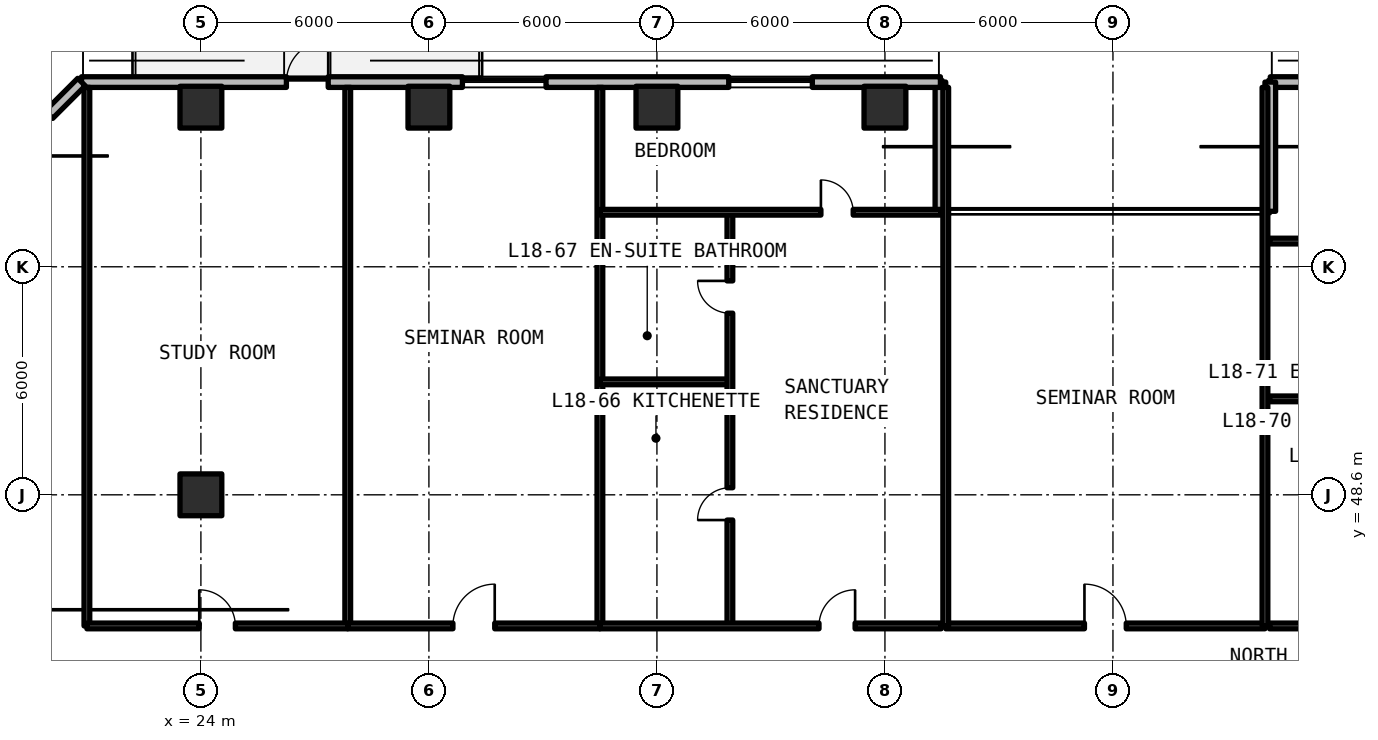
"""IFC4 building model, lengths in metres.
Left out: names, types, materials, properties, quantities, classifications, styles, units other than length and angle.
Written with IfcOpenShell. Run it as: python <this file> out.ifc"""

import sys

from ifc_helpers import new_model, si_unit, direction, frame, frame_2d, origin, origin_2d, place, context, subcontext, project, spatial, rectangle, extrude, element, fill, save


model = new_model("IFC4")
c1 = context("Model", 3, precision=1e-05, world=origin(), true_north=direction((0.0, 1.0)))
c2 = subcontext(c1, "Body", "Model", "MODEL_VIEW")
j1 = project(units=[si_unit("LENGTHUNIT", "METRE"), si_unit("PLANEANGLEUNIT", "RADIAN")], contexts=[c1])
p1 = place(None, origin())
s1 = spatial("IfcSite", under=j1, at=p1, CompositionType="ELEMENT")
p2 = place(p1, origin())
s2 = spatial("IfcBuilding", under=s1, at=p2, CompositionType="ELEMENT")
p3 = place(p2, frame((0.0, 0.0, 66.0)))
s3 = spatial("IfcBuildingStorey", under=s2, at=p3, CompositionType="ELEMENT", Elevation=66.0)
for number, where, z_axis, x_axis in (
    (1, (24.0, 48.6, 0.0), (0.0, 0.0, 1.0), (1.0, 0.0, 0.0)),
    (2, (24.0, 58.8, 0.0), (0.0, 0.0, 1.0), (1.0, 0.0, 0.0)),
    (3, (30.0, 58.8, 0.0), (0.0, 0.0, 1.0), (1.0, 0.0, 0.0)),
    (4, (36.0, 58.8, 0.0), (0.0, 0.0, 1.0), (1.0, 0.0, 0.0)),
    (5, (42.0, 58.8, 0.0), (0.0, 0.0, 1.0), (1.0, 0.0, 0.0)),
):
    element("IfcColumn", number, at=place(p3, frame(where, z_axis=z_axis, x_axis=x_axis)), inside=s3, PredefinedType="COLUMN", context=c2, shape_type="SweptSolid", body=[
        extrude(rectangle(XDim=1.1, YDim=1.1, at=origin_2d()), origin(), (0.0, 0.0, 1.0), 3.63),
    ])
p4 = place(p3, frame((96.542, 59.46, 0.0), z_axis=(0.0, 0.0, 1.0), x_axis=(-1.0, 0.0, 0.0)))
e6 = element("IfcWall", 6, at=p4, inside=s3, PredefinedType="SOLIDWALL", context=c2, shape_type="SweptSolid", body=[
    extrude(rectangle(XDim=44.402, YDim=0.28, at=frame_2d((22.201, 0.0))), origin(), (0.0, 0.0, 1.0), 3.41),
])
p5 = place(p4, frame((33.642, 0.0, 0.0)))
e7 = element("IfcOpeningElement", 7, at=p5, cuts=e6, PredefinedType="OPENING", context=c2, shape_type="SweptSolid", body=[
    extrude(rectangle(XDim=1.1, YDim=2.15, at=frame_2d((0.55, 1.075))), frame((0.0, 0.15, 0.0), z_axis=(0.0, -1.0, 0.0), x_axis=(1.0, 0.0, 0.0)), (0.0, 0.0, 1.0), 0.3),
])
p6 = place(p4, frame((20.292, 0.0, 0.0)))
e8 = element("IfcOpeningElement", 8, at=p6, cuts=e6, PredefinedType="OPENING", context=c2, shape_type="SweptSolid", body=[
    extrude(rectangle(XDim=1.1, YDim=2.15, at=frame_2d((0.55, 1.075))), frame((0.0, 0.15, 0.0), z_axis=(0.0, -1.0, 0.0), x_axis=(1.0, 0.0, 0.0)), (0.0, 0.0, 1.0), 0.3),
])
p7 = place(p4, frame((9.692, 0.0, 0.0)))
e9 = element("IfcOpeningElement", 9, at=p7, cuts=e6, PredefinedType="OPENING", context=c2, shape_type="SweptSolid", body=[
    extrude(rectangle(XDim=1.1, YDim=2.15, at=frame_2d((0.55, 1.075))), frame((0.0, 0.15, 0.0), z_axis=(0.0, -1.0, 0.0), x_axis=(1.0, 0.0, 0.0)), (0.0, 0.0, 1.0), 0.3),
])
p8 = place(p4, frame((39.514, 0.0, 0.78)))
e10 = element("IfcOpeningElement", 10, at=p8, cuts=e6, PredefinedType="OPENING", context=c2, shape_type="SweptSolid", body=[
    extrude(rectangle(XDim=2.2, YDim=1.66, at=frame_2d((1.1, 0.83))), frame((0.0, 0.15, 0.0), z_axis=(0.0, -1.0, 0.0), x_axis=(1.0, 0.0, 0.0)), (0.0, 0.0, 1.0), 0.3),
])
p9 = place(p4, frame((25.379, 0.0, 0.78)))
e11 = element("IfcOpeningElement", 11, at=p9, cuts=e6, PredefinedType="OPENING", context=c2, shape_type="SweptSolid", body=[
    extrude(rectangle(XDim=2.2, YDim=1.66, at=frame_2d((1.1, 0.83))), frame((0.0, 0.15, 0.0), z_axis=(0.0, -1.0, 0.0), x_axis=(1.0, 0.0, 0.0)), (0.0, 0.0, 1.0), 0.3),
])
p10 = place(p4, frame((2.564, 0.0, 0.78)))
e12 = element("IfcOpeningElement", 12, at=p10, cuts=e6, PredefinedType="OPENING", context=c2, shape_type="SweptSolid", body=[
    extrude(rectangle(XDim=2.2, YDim=1.66, at=frame_2d((1.1, 0.83))), frame((0.0, 0.15, 0.0), z_axis=(0.0, -1.0, 0.0), x_axis=(1.0, 0.0, 0.0)), (0.0, 0.0, 1.0), 0.3),
])
for number, where, z_axis, x_axis in (
    (13, (52.14, 59.46, 0.0), (0.0, 0.0, 1.0), (0.0, -1.0, 0.0)),
    (14, (43.46, 56.06, 0.0), (0.0, 0.0, 1.0), (0.0, 1.0, 0.0)),
):
    element("IfcWall", number, at=place(p3, frame(where, z_axis=z_axis, x_axis=x_axis)), inside=s3, PredefinedType="SOLIDWALL", context=c2, shape_type="SweptSolid", body=[
        extrude(rectangle(XDim=3.4, YDim=0.28, at=frame_2d((1.7, 0.0))), origin(), (0.0, 0.0, 1.0), 3.41),
    ])
p11 = place(p3, frame((43.46, 59.46, 0.0), z_axis=(0.0, 0.0, 1.0), x_axis=(-1.0, 0.0, 0.0)))
e15 = element("IfcWall", 15, at=p11, inside=s3, PredefinedType="SOLIDWALL", context=c2, shape_type="SweptSolid", body=[
    extrude(rectangle(XDim=22.602, YDim=0.28, at=frame_2d((11.301, 0.0))), origin(), (0.0, 0.0, 1.0), 3.41),
])
p12 = place(p11, frame((16.11, 0.0, 0.0)))
e16 = element("IfcOpeningElement", 16, at=p12, cuts=e15, PredefinedType="OPENING", context=c2, shape_type="SweptSolid", body=[
    extrude(rectangle(XDim=1.1, YDim=2.15, at=frame_2d((0.55, 1.075))), frame((0.0, 0.15, 0.0), z_axis=(0.0, -1.0, 0.0), x_axis=(1.0, 0.0, 0.0)), (0.0, 0.0, 1.0), 0.3),
])
p13 = place(p11, frame((10.378, 0.0, 0.78)))
e17 = element("IfcOpeningElement", 17, at=p13, cuts=e15, PredefinedType="OPENING", context=c2, shape_type="SweptSolid", body=[
    extrude(rectangle(XDim=2.2, YDim=1.66, at=frame_2d((1.1, 0.83))), frame((0.0, 0.15, 0.0), z_axis=(0.0, -1.0, 0.0), x_axis=(1.0, 0.0, 0.0)), (0.0, 0.0, 1.0), 0.3),
])
p14 = place(p11, frame((3.37, 0.0, 0.78)))
e18 = element("IfcOpeningElement", 18, at=p14, cuts=e15, PredefinedType="OPENING", context=c2, shape_type="SweptSolid", body=[
    extrude(rectangle(XDim=2.2, YDim=1.66, at=frame_2d((1.1, 0.83))), frame((0.0, 0.15, 0.0), z_axis=(0.0, -1.0, 0.0), x_axis=(1.0, 0.0, 0.0)), (0.0, 0.0, 1.0), 0.3),
])
p15 = place(p3, frame((20.858, 59.46, 0.0), z_axis=(0.0, 0.0, 1.0), x_axis=(-0.707106781187, -0.707106781187, 0.0)))
e19 = element("IfcWall", 19, at=p15, inside=s3, PredefinedType="SOLIDWALL", context=c2, shape_type="SweptSolid", body=[
    extrude(rectangle(XDim=5.824, YDim=0.28, at=frame_2d((2.912, 0.0))), origin(), (0.0, 0.0, 1.0), 3.41),
])
p16 = place(p15, frame((1.212, 0.0, 0.78)))
e20 = element("IfcOpeningElement", 20, at=p16, cuts=e19, PredefinedType="OPENING", context=c2, shape_type="SweptSolid", body=[
    extrude(rectangle(XDim=3.4, YDim=1.66, at=frame_2d((1.7, 0.83))), frame((0.0, 0.15, 0.0), z_axis=(0.0, -1.0, 0.0), x_axis=(1.0, 0.0, 0.0)), (0.0, 0.0, 1.0), 0.3),
])
p17 = place(p3, frame((43.6, 45.15, 0.0), z_axis=(0.0, 0.0, 1.0), x_axis=(1.0, 0.0, 0.0)))
e21 = element("IfcWall", 21, at=p17, inside=s3, PredefinedType="SOLIDWALL", context=c2, shape_type="SweptSolid", body=[
    extrude(rectangle(XDim=8.4, YDim=0.15, at=frame_2d((4.2, 0.0))), origin(), (0.0, 0.0, 1.0), 2.63),
])
p18 = place(p17, frame((3.65, 0.0, 0.0)))
e22 = element("IfcOpeningElement", 22, at=p18, cuts=e21, PredefinedType="OPENING", context=c2, shape_type="SweptSolid", body=[
    extrude(rectangle(XDim=1.1, YDim=2.15, at=frame_2d((0.55, 1.075))), frame((0.0, 0.085, 0.0), z_axis=(0.0, -1.0, 0.0), x_axis=(1.0, 0.0, 0.0)), (0.0, 0.0, 1.0), 0.17),
])
for number, where, z_axis, x_axis in (
    (23, (43.6, 45.15, 0.0), (0.0, 0.0, 1.0), (0.0, 1.0, 0.0)),
    (24, (52.0, 45.15, 0.0), (0.0, 0.0, 1.0), (0.0, 1.0, 0.0)),
    (25, (21.0, 45.15, 0.0), (0.0, 0.0, 1.0), (0.0, 1.0, 0.0)),
    (26, (27.864, 45.15, 0.0), (0.0, 0.0, 1.0), (0.0, 1.0, 0.0)),
):
    element("IfcWall", number, at=place(p3, frame(where, z_axis=z_axis, x_axis=x_axis)), inside=s3, PredefinedType="SOLIDWALL", context=c2, shape_type="SweptSolid", body=[
        extrude(rectangle(XDim=14.17, YDim=0.15, at=frame_2d((7.085, 0.0))), origin(), (0.0, 0.0, 1.0), 2.63),
    ])
p19 = place(p3, frame((21.0, 45.15, 0.0), z_axis=(0.0, 0.0, 1.0), x_axis=(1.0, 0.0, 0.0)))
e27 = element("IfcWall", 27, at=p19, inside=s3, PredefinedType="SOLIDWALL", context=c2, shape_type="SweptSolid", body=[
    extrude(rectangle(XDim=6.864, YDim=0.15, at=frame_2d((3.432, 0.0))), origin(), (0.0, 0.0, 1.0), 2.63),
])
p20 = place(p19, frame((2.957, 0.0, 0.0)))
e28 = element("IfcOpeningElement", 28, at=p20, cuts=e27, PredefinedType="OPENING", context=c2, shape_type="SweptSolid", body=[
    extrude(rectangle(XDim=0.95, YDim=2.15, at=frame_2d((0.475, 1.075))), frame((0.0, 0.085, 0.0), z_axis=(0.0, -1.0, 0.0), x_axis=(1.0, 0.0, 0.0)), (0.0, 0.0, 1.0), 0.17),
])
p21 = place(p3, frame((34.5, 45.15, 0.0), z_axis=(0.0, 0.0, 1.0), x_axis=(0.0, 1.0, 0.0)))
e29 = element("IfcWall", 29, at=p21, inside=s3, PredefinedType="SOLIDWALL", context=c2, shape_type="SweptSolid", body=[
    extrude(rectangle(XDim=14.17, YDim=0.15, at=frame_2d((7.085, 0.0))), origin(), (0.0, 0.0, 1.0), 2.63),
])
p22 = place(p3, frame((27.864, 45.15, 0.0), z_axis=(0.0, 0.0, 1.0), x_axis=(1.0, 0.0, 0.0)))
e30 = element("IfcWall", 30, at=p22, inside=s3, PredefinedType="SOLIDWALL", context=c2, shape_type="SweptSolid", body=[
    extrude(rectangle(XDim=6.635, YDim=0.15, at=frame_2d((3.318, 0.0))), origin(), (0.0, 0.0, 1.0), 2.63),
])
p23 = place(p22, frame((2.768, 0.0, 0.0)))
e31 = element("IfcOpeningElement", 31, at=p23, cuts=e30, PredefinedType="OPENING", context=c2, shape_type="SweptSolid", body=[
    extrude(rectangle(XDim=1.1, YDim=2.15, at=frame_2d((0.55, 1.075))), frame((0.0, 0.085, 0.0), z_axis=(0.0, -1.0, 0.0), x_axis=(1.0, 0.0, 0.0)), (0.0, 0.0, 1.0), 0.17),
])
p24 = place(p3, frame((34.5, 51.572, 0.0), z_axis=(0.0, 0.0, 1.0), x_axis=(1.0, 0.0, 0.0)))
e32 = element("IfcWall", 32, at=p24, inside=s3, PredefinedType="PARTITIONING", context=c2, shape_type="SweptSolid", body=[
    extrude(rectangle(XDim=3.42, YDim=0.15, at=frame_2d((1.71, 0.0))), origin(), (0.0, 0.0, 1.0), 2.63),
])
p25 = place(p3, frame((37.92, 45.15, 0.0), z_axis=(0.0, 0.0, 1.0), x_axis=(0.0, 1.0, 0.0)))
e33 = element("IfcWall", 33, at=p25, inside=s3, PredefinedType="PARTITIONING", context=c2, shape_type="SweptSolid", body=[
    extrude(rectangle(XDim=10.885, YDim=0.15, at=frame_2d((5.443, 0.0))), origin(), (0.0, 0.0, 1.0), 2.63),
])
p26 = place(p25, frame((2.786, 0.0, 0.0)))
e34 = element("IfcOpeningElement", 34, at=p26, cuts=e33, PredefinedType="OPENING", context=c2, shape_type="SweptSolid", body=[
    extrude(rectangle(XDim=0.85, YDim=2.1, at=frame_2d((0.425, 1.05))), frame((0.0, 0.085, 0.0), z_axis=(0.0, -1.0, 0.0), x_axis=(1.0, 0.0, 0.0)), (0.0, 0.0, 1.0), 0.17),
])
p27 = place(p25, frame((8.229, 0.0, 0.0)))
e35 = element("IfcOpeningElement", 35, at=p27, cuts=e33, PredefinedType="OPENING", context=c2, shape_type="SweptSolid", body=[
    extrude(rectangle(XDim=0.85, YDim=2.1, at=frame_2d((0.425, 1.05))), frame((0.0, 0.085, 0.0), z_axis=(0.0, -1.0, 0.0), x_axis=(1.0, 0.0, 0.0)), (0.0, 0.0, 1.0), 0.17),
])
p28 = place(p3, frame((34.5, 56.035, 0.0), z_axis=(0.0, 0.0, 1.0), x_axis=(1.0, 0.0, 0.0)))
e36 = element("IfcWall", 36, at=p28, inside=s3, PredefinedType="PARTITIONING", context=c2, shape_type="SweptSolid", body=[
    extrude(rectangle(XDim=8.98, YDim=0.15, at=frame_2d((4.49, 0.0))), origin(), (0.0, 0.0, 1.0), 2.63),
])
p29 = place(p28, frame((5.816, 0.0, 0.0)))
e37 = element("IfcOpeningElement", 37, at=p29, cuts=e36, PredefinedType="OPENING", context=c2, shape_type="SweptSolid", body=[
    extrude(rectangle(XDim=0.85, YDim=2.1, at=frame_2d((0.425, 1.05))), frame((0.0, 0.085, 0.0), z_axis=(0.0, -1.0, 0.0), x_axis=(1.0, 0.0, 0.0)), (0.0, 0.0, 1.0), 0.17),
])
p30 = place(p3, frame((34.5, 45.15, 0.0), z_axis=(0.0, 0.0, 1.0), x_axis=(1.0, 0.0, 0.0)))
e38 = element("IfcWall", 38, at=p30, inside=s3, PredefinedType="SOLIDWALL", context=c2, shape_type="SweptSolid", body=[
    extrude(rectangle(XDim=8.98, YDim=0.15, at=frame_2d((4.49, 0.0))), origin(), (0.0, 0.0, 1.0), 2.63),
])
p31 = place(p30, frame((5.766, 0.0, 0.0)))
e39 = element("IfcOpeningElement", 39, at=p31, cuts=e38, PredefinedType="OPENING", context=c2, shape_type="SweptSolid", body=[
    extrude(rectangle(XDim=0.95, YDim=2.15, at=frame_2d((0.475, 1.075))), frame((0.0, 0.085, 0.0), z_axis=(0.0, -1.0, 0.0), x_axis=(1.0, 0.0, 0.0)), (0.0, 0.0, 1.0), 0.17),
])
p32 = place(p3, frame((52.12, 51.125, 0.0), z_axis=(0.0, 0.0, 1.0), x_axis=(1.0, 0.0, 0.0)))
e40 = element("IfcWall", 40, at=p32, inside=s3, PredefinedType="PARTITIONING", context=c2, shape_type="SweptSolid", body=[
    extrude(rectangle(XDim=3.8, YDim=0.15, at=frame_2d((1.9, 0.0))), origin(), (0.0, 0.0, 1.0), 2.63),
])
p33 = place(p3, frame((52.12, 55.277, 0.0), z_axis=(0.0, 0.0, 1.0), x_axis=(1.0, 0.0, 0.0)))
e41 = element("IfcWall", 41, at=p33, inside=s3, PredefinedType="PARTITIONING", context=c2, shape_type="SweptSolid", body=[
    extrude(rectangle(XDim=7.296, YDim=0.15, at=frame_2d((3.648, 0.0))), origin(), (0.0, 0.0, 1.0), 2.63),
])
p34 = place(p33, frame((5.163, 0.0, 0.0)))
e42 = element("IfcOpeningElement", 42, at=p34, cuts=e41, PredefinedType="OPENING", context=c2, shape_type="SweptSolid", body=[
    extrude(rectangle(XDim=0.85, YDim=2.1, at=frame_2d((0.425, 1.05))), frame((0.0, 0.085, 0.0), z_axis=(0.0, -1.0, 0.0), x_axis=(1.0, 0.0, 0.0)), (0.0, 0.0, 1.0), 0.17),
])
p35 = place(p3, frame((52.12, 45.15, 0.0), z_axis=(0.0, 0.0, 1.0), x_axis=(1.0, 0.0, 0.0)))
e43 = element("IfcWall", 43, at=p35, inside=s3, PredefinedType="SOLIDWALL", context=c2, shape_type="SweptSolid", body=[
    extrude(rectangle(XDim=7.296, YDim=0.15, at=frame_2d((3.648, 0.0))), origin(), (0.0, 0.0, 1.0), 2.63),
])
p36 = place(p35, frame((5.113, 0.0, 0.0)))
e44 = element("IfcOpeningElement", 44, at=p36, cuts=e43, PredefinedType="OPENING", context=c2, shape_type="SweptSolid", body=[
    extrude(rectangle(XDim=0.95, YDim=2.15, at=frame_2d((0.475, 1.075))), frame((0.0, 0.085, 0.0), z_axis=(0.0, -1.0, 0.0), x_axis=(1.0, 0.0, 0.0)), (0.0, 0.0, 1.0), 0.17),
])
p37 = place(p12, frame((1.1, 0.0, 0.0), z_axis=(0.0, 0.0, 1.0), x_axis=(-1.0, 0.0, 0.0)))
e45 = element("IfcDoor", 45, at=p37, inside=s3, OperationType="SINGLE_SWING_RIGHT", PredefinedType="DOOR", context=c2, shape_type="SweptSolid", body=[
    extrude(rectangle(XDim=1.1, YDim=2.15, at=frame_2d((0.55, 1.075))), frame((0.0, 0.025, 0.0), z_axis=(0.0, -1.0, 0.0), x_axis=(1.0, 0.0, 0.0)), (0.0, 0.0, 1.0), 0.05),
])
fill(e16, e45)
p38 = place(p13, origin())
e46 = element("IfcWindow", 46, at=p38, inside=s3, PartitioningType="SINGLE_PANEL", PredefinedType="WINDOW", context=c2, shape_type="SweptSolid", body=[
    extrude(rectangle(XDim=2.2, YDim=1.66, at=frame_2d((1.1, 0.83))), frame((0.0, 0.03, 0.0), z_axis=(0.0, -1.0, 0.0), x_axis=(1.0, 0.0, 0.0)), (0.0, 0.0, 1.0), 0.06),
])
fill(e17, e46)
p39 = place(p14, origin())
e47 = element("IfcWindow", 47, at=p39, inside=s3, PartitioningType="SINGLE_PANEL", PredefinedType="WINDOW", context=c2, shape_type="SweptSolid", body=[
    extrude(rectangle(XDim=2.2, YDim=1.66, at=frame_2d((1.1, 0.83))), frame((0.0, 0.03, 0.0), z_axis=(0.0, -1.0, 0.0), x_axis=(1.0, 0.0, 0.0)), (0.0, 0.0, 1.0), 0.06),
])
fill(e18, e47)
p40 = place(p18, origin())
e48 = element("IfcDoor", 48, at=p40, inside=s3, OperationType="SINGLE_SWING_LEFT", PredefinedType="DOOR", context=c2, shape_type="SweptSolid", body=[
    extrude(rectangle(XDim=1.1, YDim=2.15, at=frame_2d((0.55, 1.075))), frame((0.0, 0.025, 0.0), z_axis=(0.0, -1.0, 0.0), x_axis=(1.0, 0.0, 0.0)), (0.0, 0.0, 1.0), 0.05),
])
fill(e22, e48)
p41 = place(p20, origin())
e49 = element("IfcDoor", 49, at=p41, inside=s3, OperationType="SINGLE_SWING_LEFT", PredefinedType="DOOR", context=c2, shape_type="SweptSolid", body=[
    extrude(rectangle(XDim=0.95, YDim=2.15, at=frame_2d((0.475, 1.075))), frame((0.0, 0.025, 0.0), z_axis=(0.0, -1.0, 0.0), x_axis=(1.0, 0.0, 0.0)), (0.0, 0.0, 1.0), 0.05),
])
fill(e28, e49)
p42 = place(p23, origin())
e50 = element("IfcDoor", 50, at=p42, inside=s3, OperationType="SINGLE_SWING_RIGHT", PredefinedType="DOOR", context=c2, shape_type="SweptSolid", body=[
    extrude(rectangle(XDim=1.1, YDim=2.15, at=frame_2d((0.55, 1.075))), frame((0.0, 0.025, 0.0), z_axis=(0.0, -1.0, 0.0), x_axis=(1.0, 0.0, 0.0)), (0.0, 0.0, 1.0), 0.05),
])
fill(e31, e50)
p43 = place(p26, origin())
e51 = element("IfcDoor", 51, at=p43, inside=s3, OperationType="SINGLE_SWING_LEFT", PredefinedType="DOOR", context=c2, shape_type="SweptSolid", body=[
    extrude(rectangle(XDim=0.85, YDim=2.1, at=frame_2d((0.425, 1.05))), frame((0.0, 0.025, 0.0), z_axis=(0.0, -1.0, 0.0), x_axis=(1.0, 0.0, 0.0)), (0.0, 0.0, 1.0), 0.05),
])
fill(e34, e51)
p44 = place(p27, origin())
e52 = element("IfcDoor", 52, at=p44, inside=s3, OperationType="SINGLE_SWING_RIGHT", PredefinedType="DOOR", context=c2, shape_type="SweptSolid", body=[
    extrude(rectangle(XDim=0.85, YDim=2.1, at=frame_2d((0.425, 1.05))), frame((0.0, 0.025, 0.0), z_axis=(0.0, -1.0, 0.0), x_axis=(1.0, 0.0, 0.0)), (0.0, 0.0, 1.0), 0.05),
])
fill(e35, e52)
p45 = place(p29, origin())
e53 = element("IfcDoor", 53, at=p45, inside=s3, OperationType="SINGLE_SWING_LEFT", PredefinedType="DOOR", context=c2, shape_type="SweptSolid", body=[
    extrude(rectangle(XDim=0.85, YDim=2.1, at=frame_2d((0.425, 1.05))), frame((0.0, 0.025, 0.0), z_axis=(0.0, -1.0, 0.0), x_axis=(1.0, 0.0, 0.0)), (0.0, 0.0, 1.0), 0.05),
])
fill(e37, e53)
p46 = place(p31, origin())
e54 = element("IfcDoor", 54, at=p46, inside=s3, OperationType="SINGLE_SWING_RIGHT", PredefinedType="DOOR", context=c2, shape_type="SweptSolid", body=[
    extrude(rectangle(XDim=0.95, YDim=2.15, at=frame_2d((0.475, 1.075))), frame((0.0, 0.025, 0.0), z_axis=(0.0, -1.0, 0.0), x_axis=(1.0, 0.0, 0.0)), (0.0, 0.0, 1.0), 0.05),
])
fill(e39, e54)
save(model, sys.argv[1])
